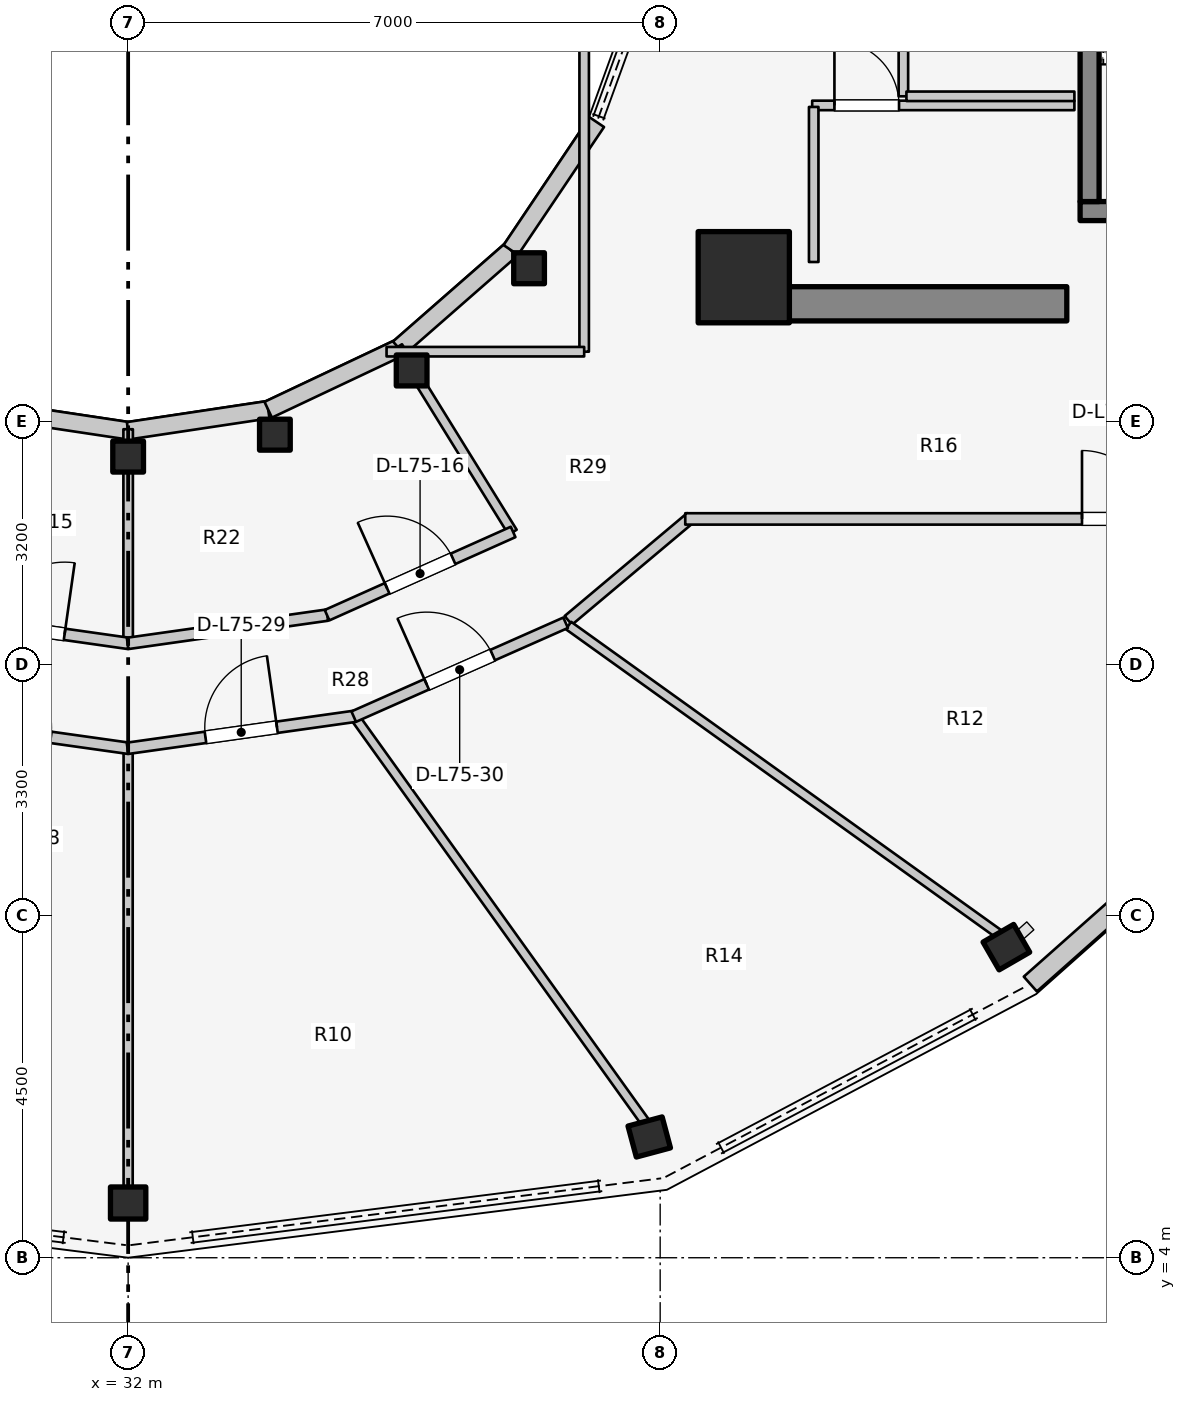
"""IFC4 building model, lengths in metres.
Left out: names, types, materials, properties, quantities, classifications, styles, units other than length and angle.
Written with IfcOpenShell. Run it as: python <this file> out.ifc"""

import sys

from ifc_helpers import new_model, si_unit, direction, frame, frame_2d, origin, origin_2d, place, context, subcontext, project, spatial, rectangle, i_section, extrude, element, fill, save


model = new_model("IFC4")
c1 = context("Model", 3, precision=1e-05, world=origin(), true_north=direction((0.0, 1.0)))
c2 = subcontext(c1, "Body", "Model", "MODEL_VIEW")
j1 = project(units=[si_unit("LENGTHUNIT", "METRE"), si_unit("PLANEANGLEUNIT", "RADIAN")], contexts=[c1])
p1 = place(None, origin())
s1 = spatial("IfcSite", under=j1, at=p1, CompositionType="ELEMENT")
p2 = place(p1, origin())
s2 = spatial("IfcBuilding", under=s1, at=p2, CompositionType="ELEMENT")
p3 = place(p2, frame((0.0, 0.0, 246.0)))
s3 = spatial("IfcBuildingStorey", under=s2, at=p3, CompositionType="ELEMENT", Elevation=246.0)
p4 = place(p3, frame((39.85, 16.55, 0.0), z_axis=(0.0, 0.0, 1.0), x_axis=(1.0, 0.0, 0.0)))
e1 = element("IfcWall", 1, at=p4, inside=s3, PredefinedType="SHEAR", context=c2, shape_type="SweptSolid", body=[
    extrude(rectangle(XDim=4.5, YDim=0.45, at=frame_2d((2.25, 0.0))), origin(), (0.0, 0.0, 1.0), 3.6),
])
p5 = place(p3, frame((44.525, 17.77, 0.0), z_axis=(0.0, 0.0, 1.0), x_axis=(1.0, 0.0, 0.0)))
e2 = element("IfcWall", 2, at=p5, inside=s3, PredefinedType="SOLIDWALL", context=c2, shape_type="SweptSolid", body=[
    extrude(rectangle(XDim=3.37, YDim=0.25, at=frame_2d((1.685, 0.0))), origin(), (0.0, 0.0, 1.0), 3.6),
])
p6 = place(p5, frame((1.135, 0.0, 0.0)))
e3 = element("IfcOpeningElement", 3, at=p6, cuts=e2, PredefinedType="OPENING", context=c2, shape_type="SweptSolid", body=[
    extrude(rectangle(XDim=1.1, YDim=2.1, at=frame_2d((0.55, 1.05))), frame((0.0, 0.135, 0.0), z_axis=(0.0, -1.0, 0.0), x_axis=(1.0, 0.0, 0.0)), (0.0, 0.0, 1.0), 0.27),
])
p7 = place(p3, frame((44.65, 17.895, 0.0), z_axis=(0.0, 0.0, 1.0), x_axis=(0.0, 1.0, 0.0)))
e4 = element("IfcWall", 4, at=p7, inside=s3, PredefinedType="SOLIDWALL", context=c2, shape_type="SweptSolid", body=[
    extrude(rectangle(XDim=7.81, YDim=0.25, at=frame_2d((3.905, 0.0))), origin(), (0.0, 0.0, 1.0), 3.6),
])
p8 = place(p3, frame((40.1, 16.9, 0.0), z_axis=(0.0, 0.0, 1.0), x_axis=(1.0, 0.0, 0.0)))
e5 = element("IfcColumn", 5, at=p8, inside=s3, PredefinedType="COLUMN", context=c2, shape_type="SweptSolid", body=[
    extrude(rectangle(XDim=1.2, YDim=1.2, at=origin_2d()), origin(), (0.0, 0.0, 1.0), 3.6),
])
p9 = place(p3, frame((32.0, 14.54, 0.0), z_axis=(0.0, 0.0, 1.0), x_axis=(1.0, 0.0, 0.0)))
e6 = element("IfcColumn", 6, at=p9, inside=s3, PredefinedType="COLUMN", context=c2, shape_type="SweptSolid", body=[
    extrude(i_section(OverallWidth=0.404, OverallDepth=0.407, WebThickness=0.027, FlangeThickness=0.044, FilletRadius=0.025, at=origin_2d()), origin(), (0.0, 0.0, 1.0), 3.6),
])
p10 = place(p3, frame((32.0, 4.72, 0.0), z_axis=(0.0, 0.0, 1.0), x_axis=(0.0, -1.0, 0.0)))
e7 = element("IfcColumn", 7, at=p10, inside=s3, PredefinedType="COLUMN", context=c2, shape_type="SweptSolid", body=[
    extrude(i_section(OverallWidth=0.422, OverallDepth=0.465, WebThickness=0.045, FlangeThickness=0.073, FilletRadius=0.025, at=origin_2d()), origin(), (0.0, 0.0, 1.0), 3.6),
])
p11 = place(p3, frame((33.931, 14.828, 0.0), z_axis=(0.0, 0.0, 1.0), x_axis=(1.0, 0.0, 0.0)))
e8 = element("IfcColumn", 8, at=p11, inside=s3, PredefinedType="COLUMN", context=c2, shape_type="SweptSolid", body=[
    extrude(i_section(OverallWidth=0.404, OverallDepth=0.407, WebThickness=0.027, FlangeThickness=0.044, FilletRadius=0.025, at=origin_2d()), origin(), (0.0, 0.0, 1.0), 3.6),
])
p12 = place(p3, frame((38.856, 5.589, 0.0), z_axis=(0.0, 0.0, 1.0), x_axis=(0.258819045103, -0.965925826289, 0.0)))
e9 = element("IfcColumn", 9, at=p12, inside=s3, PredefinedType="COLUMN", context=c2, shape_type="SweptSolid", body=[
    extrude(i_section(OverallWidth=0.422, OverallDepth=0.465, WebThickness=0.045, FlangeThickness=0.073, FilletRadius=0.025, at=origin_2d()), origin(), (0.0, 0.0, 1.0), 3.6),
])
p13 = place(p3, frame((35.73, 15.673, 0.0), z_axis=(0.0, 0.0, 1.0), x_axis=(1.0, 0.0, 0.0)))
e10 = element("IfcColumn", 10, at=p13, inside=s3, PredefinedType="COLUMN", context=c2, shape_type="SweptSolid", body=[
    extrude(i_section(OverallWidth=0.404, OverallDepth=0.407, WebThickness=0.027, FlangeThickness=0.044, FilletRadius=0.025, at=origin_2d()), origin(), (0.0, 0.0, 1.0), 3.6),
])
p14 = place(p3, frame((43.555, 8.086, 0.0), z_axis=(0.0, 0.0, 1.0), x_axis=(0.5, -0.866025403784, 0.0)))
e11 = element("IfcColumn", 11, at=p14, inside=s3, PredefinedType="COLUMN", context=c2, shape_type="SweptSolid", body=[
    extrude(i_section(OverallWidth=0.422, OverallDepth=0.465, WebThickness=0.045, FlangeThickness=0.073, FilletRadius=0.025, at=origin_2d()), origin(), (0.0, 0.0, 1.0), 3.6),
])
p15 = place(p3, frame((37.275, 17.018, 0.0), z_axis=(0.0, 0.0, 1.0), x_axis=(1.0, 0.0, 0.0)))
e12 = element("IfcColumn", 12, at=p15, inside=s3, PredefinedType="COLUMN", context=c2, shape_type="SweptSolid", body=[
    extrude(i_section(OverallWidth=0.404, OverallDepth=0.407, WebThickness=0.027, FlangeThickness=0.044, FilletRadius=0.025, at=origin_2d()), origin(), (0.0, 0.0, 1.0), 3.6),
])
for number, where, z_axis, x_axis in (
    (13, (30.157, 15.157, 0.0), (0.0, 0.0, 1.0), (0.989, -0.149, 0.0)),
    (14, (32.0, 14.88, 0.0), (0.0, 0.0, 1.0), (0.989, 0.149, 0.0)),
):
    element("IfcWall", number, at=place(p3, frame(where, z_axis=z_axis, x_axis=x_axis)), inside=s3, PredefinedType="STANDARD", context=c2, shape_type="SweptSolid", body=[
        extrude(rectangle(XDim=1.864, YDim=0.23, at=frame_2d((0.932, 0.0))), origin(), (0.0, 0.0, 1.0), 2.6),
    ])
p16 = place(p3, frame((33.843, 15.157, 0.0), z_axis=(0.0, 0.0, 1.0), x_axis=(0.904179699603, 0.427152280606, 0.0)))
e15 = element("IfcWall", 15, at=p16, inside=s3, PredefinedType="STANDARD", context=c2, shape_type="SweptSolid", body=[
    extrude(rectangle(XDim=1.899, YDim=0.23, at=frame_2d((0.95, 0.0))), origin(), (0.0, 0.0, 1.0), 2.6),
])
p17 = place(p3, frame((35.56, 15.968, 0.0), z_axis=(0.0, 0.0, 1.0), x_axis=(0.752576694707, 0.658504607869, 0.0)))
e16 = element("IfcWall", 16, at=p17, inside=s3, PredefinedType="STANDARD", context=c2, shape_type="SweptSolid", body=[
    extrude(rectangle(XDim=1.959, YDim=0.23, at=frame_2d((0.98, 0.0))), origin(), (0.0, 0.0, 1.0), 2.6),
])
p18 = place(p3, frame((37.035, 17.258, 0.0), z_axis=(0.0, 0.0, 1.0), x_axis=(0.558197800898, 0.829707909492, 0.0)))
e17 = element("IfcWall", 17, at=p18, inside=s3, PredefinedType="STANDARD", context=c2, shape_type="SweptSolid", body=[
    extrude(rectangle(XDim=2.027, YDim=0.23, at=frame_2d((1.013, 0.0))), origin(), (0.0, 0.0, 1.0), 2.6),
])
p19 = place(p3, frame((43.87, 7.601, 0.0), z_axis=(0.0, 0.0, 1.0), x_axis=(0.748165854006, 0.663511759428, 0.0)))
e18 = element("IfcWall", 18, at=p19, inside=s3, PredefinedType="STANDARD", context=c2, shape_type="SweptSolid", body=[
    extrude(rectangle(XDim=4.929, YDim=0.26, at=frame_2d((2.464, 0.0))), origin(), (0.0, 0.0, 1.0), 3.29),
])
p20 = place(p3, frame((41.0, 19.16, 0.0), z_axis=(0.0, 0.0, 1.0), x_axis=(1.0, 0.0, 0.0)))
e19 = element("IfcWall", 19, at=p20, inside=s3, PredefinedType="PARTITIONING", context=c2, shape_type="SweptSolid", body=[
    extrude(rectangle(XDim=3.45, YDim=0.125, at=frame_2d((1.725, 0.0))), origin(), (0.0, 0.0, 1.0), 2.62),
])
p21 = place(p20, frame((0.293, 0.0, 0.0)))
e20 = element("IfcOpeningElement", 20, at=p21, cuts=e19, PredefinedType="OPENING", context=c2, shape_type="SweptSolid", body=[
    extrude(rectangle(XDim=0.85, YDim=2.05, at=frame_2d((0.425, 1.025))), frame((0.0, 0.073, 0.0), z_axis=(0.0, -1.0, 0.0), x_axis=(1.0, 0.0, 0.0)), (0.0, 0.0, 1.0), 0.145),
])
p22 = place(p3, frame((41.02, 17.1, 0.0), z_axis=(0.0, 0.0, 1.0), x_axis=(0.0, 1.0, 0.0)))
e21 = element("IfcWall", 21, at=p22, inside=s3, PredefinedType="PARTITIONING", context=c2, shape_type="SweptSolid", body=[
    extrude(rectangle(XDim=2.04, YDim=0.125, at=frame_2d((1.02, 0.0))), origin(), (0.0, 0.0, 1.0), 3.295),
])
p23 = place(p3, frame((42.2, 19.28, 0.0), z_axis=(0.0, 0.0, 1.0), x_axis=(0.0, 1.0, 0.0)))
e22 = element("IfcWall", 22, at=p23, inside=s3, PredefinedType="PARTITIONING", context=c2, shape_type="SweptSolid", body=[
    extrude(rectangle(XDim=2.4, YDim=0.125, at=frame_2d((1.2, 0.0))), origin(), (0.0, 0.0, 1.0), 3.295),
])
p24 = place(p23, frame((0.7, 0.0, 0.0)))
e23 = element("IfcOpeningElement", 23, at=p24, cuts=e22, PredefinedType="OPENING", context=c2, shape_type="SweptSolid", body=[
    extrude(rectangle(XDim=0.85, YDim=2.05, at=frame_2d((0.425, 1.025))), frame((0.0, 0.073, 0.0), z_axis=(0.0, -1.0, 0.0), x_axis=(1.0, 0.0, 0.0)), (0.0, 0.0, 1.0), 0.145),
])
p25 = place(p3, frame((42.24, 19.28, 0.0), z_axis=(0.0, 0.0, 1.0), x_axis=(1.0, 0.0, 0.0)))
e24 = element("IfcWall", 24, at=p25, inside=s3, PredefinedType="PARTITIONING", context=c2, shape_type="SweptSolid", body=[
    extrude(rectangle(XDim=2.21, YDim=0.125, at=frame_2d((1.105, 0.0))), origin(), (0.0, 0.0, 1.0), 2.62),
])
p26 = place(p3, frame((32.0, 14.9, 0.0), z_axis=(0.0, 0.0, 1.0), x_axis=(0.0, -1.0, 0.0)))
e25 = element("IfcWall", 25, at=p26, inside=s3, PredefinedType="PARTITIONING", context=c2, shape_type="SweptSolid", body=[
    extrude(rectangle(XDim=2.818, YDim=0.125, at=frame_2d((1.409, 0.0))), origin(), (0.0, 0.0, 1.0), 2.672),
])
p27 = place(p3, frame((35.55, 15.985, 0.0), z_axis=(0.0, 0.0, 1.0), x_axis=(0.52592395012, -0.850531597702, 0.0)))
e26 = element("IfcWall", 26, at=p27, inside=s3, PredefinedType="PARTITIONING", context=c2, shape_type="SweptSolid", body=[
    extrude(rectangle(XDim=2.869, YDim=0.125, at=frame_2d((1.435, 0.0))), origin(), (0.0, 0.0, 1.0), 2.672),
])
p28 = place(p3, frame((29.38, 12.455, 0.0), z_axis=(0.0, 0.0, 1.0), x_axis=(0.990096156252, -0.140390887794, 0.0)))
e27 = element("IfcWall", 27, at=p28, inside=s3, PredefinedType="PARTITIONING", context=c2, shape_type="SweptSolid", body=[
    extrude(rectangle(XDim=2.654, YDim=0.15, at=frame_2d((1.327, 0.0))), origin(), (0.0, 0.0, 1.0), 2.816),
])
p29 = place(p28, frame((0.852, 0.0, 0.0)))
e28 = element("IfcOpeningElement", 28, at=p29, cuts=e27, PredefinedType="OPENING", context=c2, shape_type="SweptSolid", body=[
    extrude(rectangle(XDim=0.95, YDim=2.1, at=frame_2d((0.475, 1.05))), frame((0.0, 0.085, 0.0), z_axis=(0.0, -1.0, 0.0), x_axis=(1.0, 0.0, 0.0)), (0.0, 0.0, 1.0), 0.17),
])
p30 = place(p3, frame((31.993, 12.082, 0.0), z_axis=(0.0, 0.0, 1.0), x_axis=(0.990096156252, 0.140390887794, 0.0)))
e29 = element("IfcWall", 29, at=p30, inside=s3, PredefinedType="PARTITIONING", context=c2, shape_type="SweptSolid", body=[
    extrude(rectangle(XDim=2.654, YDim=0.15, at=frame_2d((1.327, 0.0))), origin(), (0.0, 0.0, 1.0), 2.816),
])
p31 = place(p3, frame((34.617, 12.454, 0.0), z_axis=(0.0, 0.0, 1.0), x_axis=(0.912859324183, 0.408274239027, 0.0)))
e30 = element("IfcWall", 30, at=p31, inside=s3, PredefinedType="PARTITIONING", context=c2, shape_type="SweptSolid", body=[
    extrude(rectangle(XDim=2.682, YDim=0.15, at=frame_2d((1.341, 0.0))), origin(), (0.0, 0.0, 1.0), 2.816),
])
p32 = place(p31, frame((0.866, 0.0, 0.0)))
e31 = element("IfcOpeningElement", 31, at=p32, cuts=e30, PredefinedType="OPENING", context=c2, shape_type="SweptSolid", body=[
    extrude(rectangle(XDim=0.95, YDim=2.1, at=frame_2d((0.475, 1.05))), frame((0.0, 0.085, 0.0), z_axis=(0.0, -1.0, 0.0), x_axis=(1.0, 0.0, 0.0)), (0.0, 0.0, 1.0), 0.17),
])
p33 = place(p3, frame((38.0, 15.92, 0.0), z_axis=(0.0, 0.0, 1.0), x_axis=(0.0, 1.0, 0.0)))
e32 = element("IfcWall", 32, at=p33, inside=s3, PredefinedType="PARTITIONING", context=c2, shape_type="SweptSolid", body=[
    extrude(rectangle(XDim=4.28, YDim=0.125, at=frame_2d((2.14, 0.0))), origin(), (0.0, 0.0, 1.0), 2.672),
])
p34 = place(p3, frame((35.4, 15.92, 0.0), z_axis=(0.0, 0.0, 1.0), x_axis=(1.0, 0.0, 0.0)))
e33 = element("IfcWall", 33, at=p34, inside=s3, PredefinedType="PARTITIONING", context=c2, shape_type="SweptSolid", body=[
    extrude(rectangle(XDim=2.6, YDim=0.125, at=frame_2d((1.3, 0.0))), origin(), (0.0, 0.0, 1.0), 2.672),
])
p35 = place(p3, frame((37.791, 12.385, 0.0), z_axis=(0.0, 0.0, 1.0), x_axis=(0.765677451641, 0.643224719711, 0.0)))
e34 = element("IfcWall", 34, at=p35, inside=s3, PredefinedType="PARTITIONING", context=c2, shape_type="SweptSolid", body=[
    extrude(rectangle(XDim=2.105, YDim=0.15, at=frame_2d((1.053, 0.0))), origin(), (0.0, 0.0, 1.0), 2.816),
])
p36 = place(p3, frame((39.33, 13.72, 0.0), z_axis=(0.0, 0.0, 1.0), x_axis=(1.0, 0.0, 0.0)))
e35 = element("IfcWall", 35, at=p36, inside=s3, PredefinedType="PARTITIONING", context=c2, shape_type="SweptSolid", body=[
    extrude(rectangle(XDim=7.52, YDim=0.15, at=frame_2d((3.76, 0.0))), origin(), (0.0, 0.0, 1.0), 2.816),
])
p37 = place(p36, frame((5.22, 0.0, 0.0)))
e36 = element("IfcOpeningElement", 36, at=p37, cuts=e35, PredefinedType="OPENING", context=c2, shape_type="SweptSolid", body=[
    extrude(rectangle(XDim=0.9, YDim=2.1, at=frame_2d((0.45, 1.05))), frame((0.0, 0.085, 0.0), z_axis=(0.0, -1.0, 0.0), x_axis=(1.0, 0.0, 0.0)), (0.0, 0.0, 1.0), 0.17),
])
p38 = place(p3, frame((32.0, 10.647, 0.0), z_axis=(0.0, 0.0, 1.0), x_axis=(0.0, -1.0, 0.0)))
e37 = element("IfcWall", 37, at=p38, inside=s3, PredefinedType="MOVABLE", context=c2, shape_type="SweptSolid", body=[
    extrude(rectangle(XDim=5.727, YDim=0.12, at=frame_2d((2.864, 0.0))), origin(), (0.0, 0.0, 1.0), 2.66),
])
p39 = place(p3, frame((35.008, 11.076, 0.0), z_axis=(0.0, 0.0, 1.0), x_axis=(0.582726066442, -0.812668648029, 0.0)))
e38 = element("IfcWall", 38, at=p39, inside=s3, PredefinedType="MOVABLE", context=c2, shape_type="SweptSolid", body=[
    extrude(rectangle(XDim=6.515, YDim=0.12, at=frame_2d((3.257, 0.0))), origin(), (0.0, 0.0, 1.0), 2.66),
])
p40 = place(p3, frame((37.794, 12.318, 0.0), z_axis=(0.0, 0.0, 1.0), x_axis=(0.812763742602, -0.582593424879, 0.0)))
e39 = element("IfcWall", 39, at=p40, inside=s3, PredefinedType="MOVABLE", context=c2, shape_type="SweptSolid", body=[
    extrude(rectangle(XDim=6.966, YDim=0.12, at=frame_2d((3.483, 0.0))), origin(), (0.0, 0.0, 1.0), 2.66),
])
p41 = place(p3, frame((29.016, 11.123, 0.0), z_axis=(0.0, 0.0, 1.0), x_axis=(0.990225561979, -0.139475217886, 0.0)))
e40 = element("IfcWall", 40, at=p41, inside=s3, PredefinedType="PARTITIONING", context=c2, shape_type="SweptSolid", body=[
    extrude(rectangle(XDim=3.021, YDim=0.15, at=frame_2d((1.511, 0.0))), origin(), (0.0, 0.0, 1.0), 2.816),
])
p42 = place(p41, frame((1.036, 0.0, 0.0)))
e41 = element("IfcOpeningElement", 41, at=p42, cuts=e40, PredefinedType="OPENING", context=c2, shape_type="SweptSolid", body=[
    extrude(rectangle(XDim=0.95, YDim=2.1, at=frame_2d((0.475, 1.05))), frame((0.0, 0.085, 0.0), z_axis=(0.0, -1.0, 0.0), x_axis=(1.0, 0.0, 0.0)), (0.0, 0.0, 1.0), 0.17),
])
p43 = place(p3, frame((31.992, 10.702, 0.0), z_axis=(0.0, 0.0, 1.0), x_axis=(0.990225561979, 0.139475217886, 0.0)))
e42 = element("IfcWall", 42, at=p43, inside=s3, PredefinedType="PARTITIONING", context=c2, shape_type="SweptSolid", body=[
    extrude(rectangle(XDim=3.021, YDim=0.15, at=frame_2d((1.511, 0.0))), origin(), (0.0, 0.0, 1.0), 2.816),
])
p44 = place(p43, frame((1.036, 0.0, 0.0)))
e43 = element("IfcOpeningElement", 43, at=p44, cuts=e42, PredefinedType="OPENING", context=c2, shape_type="SweptSolid", body=[
    extrude(rectangle(XDim=0.95, YDim=2.1, at=frame_2d((0.475, 1.05))), frame((0.0, 0.085, 0.0), z_axis=(0.0, -1.0, 0.0), x_axis=(1.0, 0.0, 0.0)), (0.0, 0.0, 1.0), 0.17),
])
p45 = place(p3, frame((34.968, 11.119, 0.0), z_axis=(0.0, 0.0, 1.0), x_axis=(0.914302802833, 0.405031337963, 0.0)))
e44 = element("IfcWall", 44, at=p45, inside=s3, PredefinedType="PARTITIONING", context=c2, shape_type="SweptSolid", body=[
    extrude(rectangle(XDim=3.049, YDim=0.15, at=frame_2d((1.525, 0.0))), origin(), (0.0, 0.0, 1.0), 2.816),
])
p46 = place(p45, frame((1.05, 0.0, 0.0)))
e45 = element("IfcOpeningElement", 45, at=p46, cuts=e44, PredefinedType="OPENING", context=c2, shape_type="SweptSolid", body=[
    extrude(rectangle(XDim=0.95, YDim=2.1, at=frame_2d((0.475, 1.05))), frame((0.0, 0.085, 0.0), z_axis=(0.0, -1.0, 0.0), x_axis=(1.0, 0.0, 0.0)), (0.0, 0.0, 1.0), 0.17),
])
p47 = place(p21, origin())
e46 = element("IfcDoor", 46, at=p47, inside=s3, OperationType="SINGLE_SWING_LEFT", PredefinedType="DOOR", context=c2, shape_type="SweptSolid", body=[
    extrude(rectangle(XDim=0.85, YDim=2.05, at=frame_2d((0.425, 1.025))), frame((0.0, 0.025, 0.0), z_axis=(0.0, -1.0, 0.0), x_axis=(1.0, 0.0, 0.0)), (0.0, 0.0, 1.0), 0.05),
])
fill(e20, e46)
p48 = place(p29, origin())
e47 = element("IfcDoor", 47, at=p48, inside=s3, OperationType="SINGLE_SWING_RIGHT", PredefinedType="DOOR", context=c2, shape_type="SweptSolid", body=[
    extrude(rectangle(XDim=0.95, YDim=2.1, at=frame_2d((0.475, 1.05))), frame((0.0, 0.025, 0.0), z_axis=(0.0, -1.0, 0.0), x_axis=(1.0, 0.0, 0.0)), (0.0, 0.0, 1.0), 0.05),
])
fill(e28, e47)
p49 = place(p32, origin())
e48 = element("IfcDoor", 48, at=p49, inside=s3, OperationType="SINGLE_SWING_LEFT", PredefinedType="DOOR", context=c2, shape_type="SweptSolid", body=[
    extrude(rectangle(XDim=0.95, YDim=2.1, at=frame_2d((0.475, 1.05))), frame((0.0, 0.025, 0.0), z_axis=(0.0, -1.0, 0.0), x_axis=(1.0, 0.0, 0.0)), (0.0, 0.0, 1.0), 0.05),
])
fill(e31, e48)
p50 = place(p37, origin())
e49 = element("IfcDoor", 49, at=p50, inside=s3, OperationType="SINGLE_SWING_LEFT", PredefinedType="DOOR", context=c2, shape_type="SweptSolid", body=[
    extrude(rectangle(XDim=0.9, YDim=2.1, at=frame_2d((0.45, 1.05))), frame((0.0, 0.025, 0.0), z_axis=(0.0, -1.0, 0.0), x_axis=(1.0, 0.0, 0.0)), (0.0, 0.0, 1.0), 0.05),
])
fill(e36, e49)
p51 = place(p44, origin())
e50 = element("IfcDoor", 50, at=p51, inside=s3, OperationType="SINGLE_SWING_RIGHT", PredefinedType="DOOR", context=c2, shape_type="SweptSolid", body=[
    extrude(rectangle(XDim=0.95, YDim=2.1, at=frame_2d((0.475, 1.05))), frame((0.0, 0.025, 0.0), z_axis=(0.0, -1.0, 0.0), x_axis=(1.0, 0.0, 0.0)), (0.0, 0.0, 1.0), 0.05),
])
fill(e43, e50)
p52 = place(p46, origin())
e51 = element("IfcDoor", 51, at=p52, inside=s3, OperationType="SINGLE_SWING_LEFT", PredefinedType="DOOR", context=c2, shape_type="SweptSolid", body=[
    extrude(rectangle(XDim=0.95, YDim=2.1, at=frame_2d((0.475, 1.05))), frame((0.0, 0.025, 0.0), z_axis=(0.0, -1.0, 0.0), x_axis=(1.0, 0.0, 0.0)), (0.0, 0.0, 1.0), 0.05),
])
fill(e45, e51)
save(model, sys.argv[1])
